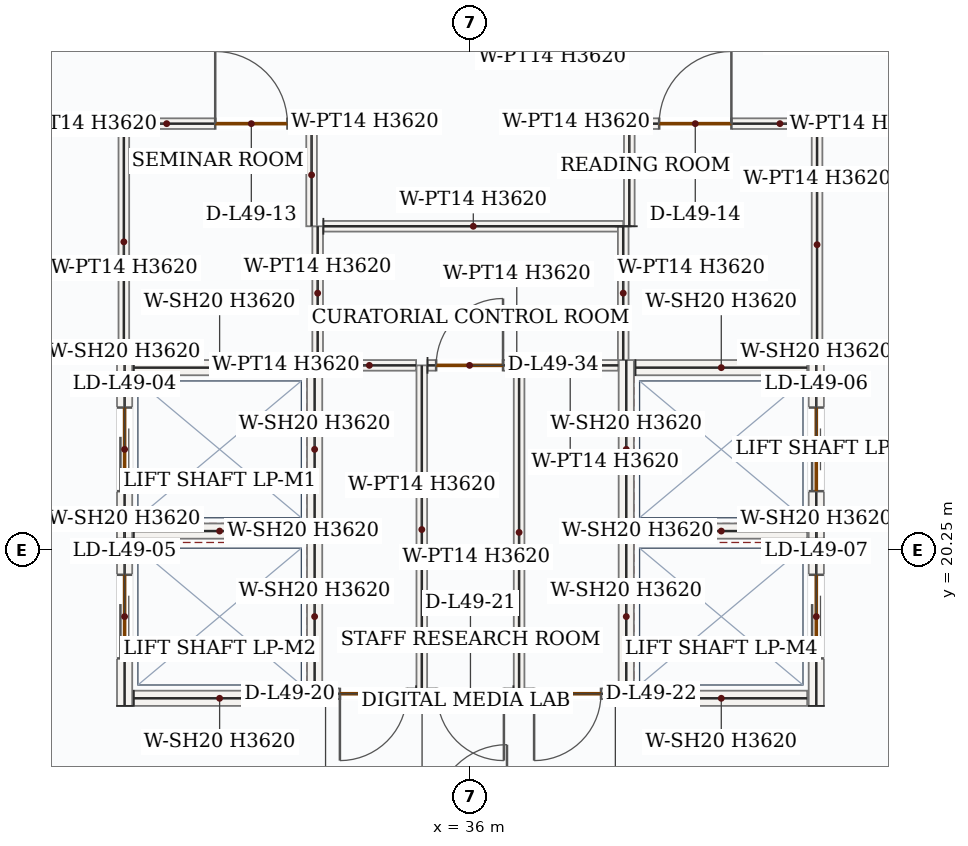
"""IFC4 building model, lengths in metres.
Left out: names, types, materials, properties, quantities, classifications, styles, units other than length and angle.
Written with IfcOpenShell. Run it as: python <this file> out.ifc"""

import sys

from ifc_helpers import new_model, si_unit, direction, frame, frame_2d, origin, place, context, subcontext, project, spatial, rectangle, extrude, source, transform, mapped, element, fill, save


model = new_model("IFC4")
c1 = context("Model", 3, precision=1e-05, world=origin(), true_north=direction((0.0, 1.0)))
c2 = subcontext(c1, "Body", "Model", "MODEL_VIEW")
j1 = project(units=[si_unit("LENGTHUNIT", "METRE"), si_unit("PLANEANGLEUNIT", "RADIAN")], contexts=[c1])
p1 = place(None, origin())
s1 = spatial("IfcSite", under=j1, at=p1, CompositionType="ELEMENT")
p2 = place(p1, origin())
s2 = spatial("IfcBuilding", under=s1, at=p2, CompositionType="ELEMENT")
p3 = place(p2, frame((0.0, 0.0, 209.7)))
s3 = spatial("IfcBuildingStorey", under=s2, at=p3, CompositionType="ELEMENT", Elevation=209.7)
p4 = place(p3, frame((31.45, 20.4, 0.0), z_axis=(0.0, 0.0, 1.0), x_axis=(0.0, 1.0, 0.0)))
e1 = element("IfcWall", 1, at=p4, inside=s3, PredefinedType="SOLIDWALL", context=c2, shape_type="SweptSolid", body=[
    extrude(rectangle(XDim=2.35, YDim=0.2, at=frame_2d((1.175, 0.0))), origin(), (0.0, 0.0, 1.0), 3.62),
])
p5 = place(p4, frame((0.625, 0.0, 0.0)))
e2 = element("IfcOpeningElement", 2, at=p5, cuts=e1, PredefinedType="OPENING", context=c2, shape_type="SweptSolid", body=[
    extrude(rectangle(XDim=1.1, YDim=2.15, at=frame_2d((0.55, 1.075))), frame((0.0, 0.11, 0.0), z_axis=(0.0, -1.0, 0.0), x_axis=(1.0, 0.0, 0.0)), (0.0, 0.0, 1.0), 0.22),
])
m1 = source(origin(), c2, "Body", "SweptSolid", [
    extrude(rectangle(XDim=2.35, YDim=0.2, at=frame_2d((1.175, 0.0))), origin(), (0.0, 0.0, 1.0), 3.62),
])
p6 = place(p3, frame((33.95, 20.4, 0.0), z_axis=(0.0, 0.0, 1.0), x_axis=(0.0, 1.0, 0.0)))
e3 = element("IfcWall", 3, at=p6, inside=s3, PredefinedType="SOLIDWALL", context=c2, shape_type="MappedRepresentation", body=[
    mapped(m1, transform((0.0, 0.0, 0.0), x_axis=(1.0, 0.0, 0.0), y_axis=(0.0, 1.0, 0.0), z_axis=(0.0, 0.0, 1.0), scale=1.0)),
])
m2 = source(origin(), c2, "Body", "SweptSolid", [
    extrude(rectangle(XDim=2.26, YDim=0.2, at=frame_2d((1.13, 0.0))), origin(), (0.0, 0.0, 1.0), 3.62),
])
for number, where, z_axis, x_axis in (
    (4, (31.57, 20.5, 0.0), (0.0, 0.0, 1.0), (1.0, 0.0, 0.0)),
    (5, (31.57, 22.65, 0.0), (0.0, 0.0, 1.0), (1.0, 0.0, 0.0)),
):
    element("IfcWall", number, at=place(p3, frame(where, z_axis=z_axis, x_axis=x_axis)), inside=s3, PredefinedType="SOLIDWALL", context=c2, shape_type="MappedRepresentation", body=[
        mapped(m2, transform((0.0, 0.0, 0.0), x_axis=(1.0, 0.0, 0.0), y_axis=(0.0, 1.0, 0.0), z_axis=(0.0, 0.0, 1.0), scale=1.0)),
    ])
p7 = place(p3, frame((31.45, 18.2, 0.0), z_axis=(0.0, 0.0, 1.0), x_axis=(0.0, 1.0, 0.0)))
e6 = element("IfcWall", 6, at=p7, inside=s3, PredefinedType="SOLIDWALL", context=c2, shape_type="SweptSolid", body=[
    extrude(rectangle(XDim=2.35, YDim=0.2, at=frame_2d((1.175, 0.0))), origin(), (0.0, 0.0, 1.0), 3.62),
])
p8 = place(p7, frame((0.625, 0.0, 0.0)))
e7 = element("IfcOpeningElement", 7, at=p8, cuts=e6, PredefinedType="OPENING", context=c2, shape_type="SweptSolid", body=[
    extrude(rectangle(XDim=1.1, YDim=2.15, at=frame_2d((0.55, 1.075))), frame((0.0, 0.11, 0.0), z_axis=(0.0, -1.0, 0.0), x_axis=(1.0, 0.0, 0.0)), (0.0, 0.0, 1.0), 0.22),
])
p9 = place(p3, frame((33.95, 18.2, 0.0), z_axis=(0.0, 0.0, 1.0), x_axis=(0.0, 1.0, 0.0)))
e8 = element("IfcWall", 8, at=p9, inside=s3, PredefinedType="SOLIDWALL", context=c2, shape_type="MappedRepresentation", body=[
    mapped(m1, transform((0.0, 0.0, 0.0), x_axis=(1.0, 0.0, 0.0), y_axis=(0.0, 1.0, 0.0), z_axis=(0.0, 0.0, 1.0), scale=1.0)),
])
p10 = place(p3, frame((31.57, 18.3, 0.0), z_axis=(0.0, 0.0, 1.0), x_axis=(1.0, 0.0, 0.0)))
e9 = element("IfcWall", 9, at=p10, inside=s3, PredefinedType="SOLIDWALL", context=c2, shape_type="MappedRepresentation", body=[
    mapped(m2, transform((0.0, 0.0, 0.0), x_axis=(1.0, 0.0, 0.0), y_axis=(0.0, 1.0, 0.0), z_axis=(0.0, 0.0, 1.0), scale=1.0)),
])
p11 = place(p3, frame((38.05, 20.4, 0.0), z_axis=(0.0, 0.0, 1.0), x_axis=(0.0, 1.0, 0.0)))
e10 = element("IfcWall", 10, at=p11, inside=s3, PredefinedType="SOLIDWALL", context=c2, shape_type="MappedRepresentation", body=[
    mapped(m1, transform((0.0, 0.0, 0.0), x_axis=(1.0, 0.0, 0.0), y_axis=(0.0, 1.0, 0.0), z_axis=(0.0, 0.0, 1.0), scale=1.0)),
])
p12 = place(p3, frame((40.55, 20.4, 0.0), z_axis=(0.0, 0.0, 1.0), x_axis=(0.0, 1.0, 0.0)))
e11 = element("IfcWall", 11, at=p12, inside=s3, PredefinedType="SOLIDWALL", context=c2, shape_type="SweptSolid", body=[
    extrude(rectangle(XDim=2.35, YDim=0.2, at=frame_2d((1.175, 0.0))), origin(), (0.0, 0.0, 1.0), 3.62),
])
p13 = place(p12, frame((0.625, 0.0, 0.0)))
e12 = element("IfcOpeningElement", 12, at=p13, cuts=e11, PredefinedType="OPENING", context=c2, shape_type="SweptSolid", body=[
    extrude(rectangle(XDim=1.1, YDim=2.15, at=frame_2d((0.55, 1.075))), frame((0.0, 0.11, 0.0), z_axis=(0.0, -1.0, 0.0), x_axis=(1.0, 0.0, 0.0)), (0.0, 0.0, 1.0), 0.22),
])
for number, where, z_axis, x_axis in (
    (13, (38.17, 20.5, 0.0), (0.0, 0.0, 1.0), (1.0, 0.0, 0.0)),
    (14, (38.17, 22.65, 0.0), (0.0, 0.0, 1.0), (1.0, 0.0, 0.0)),
):
    element("IfcWall", number, at=place(p3, frame(where, z_axis=z_axis, x_axis=x_axis)), inside=s3, PredefinedType="SOLIDWALL", context=c2, shape_type="MappedRepresentation", body=[
        mapped(m2, transform((0.0, 0.0, 0.0), x_axis=(1.0, 0.0, 0.0), y_axis=(0.0, 1.0, 0.0), z_axis=(0.0, 0.0, 1.0), scale=1.0)),
    ])
p14 = place(p3, frame((38.05, 18.2, 0.0), z_axis=(0.0, 0.0, 1.0), x_axis=(0.0, 1.0, 0.0)))
e15 = element("IfcWall", 15, at=p14, inside=s3, PredefinedType="SOLIDWALL", context=c2, shape_type="MappedRepresentation", body=[
    mapped(m1, transform((0.0, 0.0, 0.0), x_axis=(1.0, 0.0, 0.0), y_axis=(0.0, 1.0, 0.0), z_axis=(0.0, 0.0, 1.0), scale=1.0)),
])
p15 = place(p3, frame((40.55, 18.2, 0.0), z_axis=(0.0, 0.0, 1.0), x_axis=(0.0, 1.0, 0.0)))
e16 = element("IfcWall", 16, at=p15, inside=s3, PredefinedType="SOLIDWALL", context=c2, shape_type="SweptSolid", body=[
    extrude(rectangle(XDim=2.35, YDim=0.2, at=frame_2d((1.175, 0.0))), origin(), (0.0, 0.0, 1.0), 3.62),
])
p16 = place(p15, frame((0.625, 0.0, 0.0)))
e17 = element("IfcOpeningElement", 17, at=p16, cuts=e16, PredefinedType="OPENING", context=c2, shape_type="SweptSolid", body=[
    extrude(rectangle(XDim=1.1, YDim=2.15, at=frame_2d((0.55, 1.075))), frame((0.0, 0.11, 0.0), z_axis=(0.0, -1.0, 0.0), x_axis=(1.0, 0.0, 0.0)), (0.0, 0.0, 1.0), 0.22),
])
p17 = place(p3, frame((38.17, 18.3, 0.0), z_axis=(0.0, 0.0, 1.0), x_axis=(1.0, 0.0, 0.0)))
e18 = element("IfcWall", 18, at=p17, inside=s3, PredefinedType="SOLIDWALL", context=c2, shape_type="MappedRepresentation", body=[
    mapped(m2, transform((0.0, 0.0, 0.0), x_axis=(1.0, 0.0, 0.0), y_axis=(0.0, 1.0, 0.0), z_axis=(0.0, 0.0, 1.0), scale=1.0)),
])
m3 = source(origin(), c2, "Body", "SweptSolid", [
    extrude(rectangle(XDim=4.32, YDim=0.14, at=frame_2d((2.16, 0.0))), origin(), (0.0, 0.0, 1.0), 3.62),
])
p18 = place(p3, frame((35.36, 18.36, 0.0), z_axis=(0.0, 0.0, 1.0), x_axis=(0.0, 1.0, 0.0)))
e19 = element("IfcWall", 19, at=p18, inside=s3, PredefinedType="PARTITIONING", context=c2, shape_type="MappedRepresentation", body=[
    mapped(m3, transform((0.0, 0.0, 0.0), x_axis=(1.0, 0.0, 0.0), y_axis=(0.0, 1.0, 0.0), z_axis=(0.0, 0.0, 1.0), scale=1.0)),
])
p19 = place(p3, frame((35.435, 22.68, 0.0), z_axis=(0.0, 0.0, 1.0), x_axis=(1.0, 0.0, 0.0)))
e20 = element("IfcWall", 20, at=p19, inside=s3, PredefinedType="PARTITIONING", context=c2, shape_type="SweptSolid", body=[
    extrude(rectangle(XDim=1.205, YDim=0.14, at=frame_2d((0.603, 0.0))), origin(), (0.0, 0.0, 1.0), 3.62),
])
p20 = place(p19, frame((0.114, 0.0, 0.0)))
e21 = element("IfcOpeningElement", 21, at=p20, cuts=e20, PredefinedType="OPENING", context=c2, shape_type="SweptSolid", body=[
    extrude(rectangle(XDim=0.88, YDim=2.1, at=frame_2d((0.44, 1.05))), frame((0.0, 0.08, 0.0), z_axis=(0.0, -1.0, 0.0), x_axis=(1.0, 0.0, 0.0)), (0.0, 0.0, 1.0), 0.16),
])
m4 = source(origin(), c2, "Body", "SweptSolid", [
    extrude(rectangle(XDim=4.245, YDim=0.14, at=frame_2d((2.123, 0.0))), origin(), (0.0, 0.0, 1.0), 3.62),
])
p21 = place(p3, frame((36.64, 22.605, 0.0), z_axis=(0.0, 0.0, 1.0), x_axis=(0.0, -1.0, 0.0)))
e22 = element("IfcWall", 22, at=p21, inside=s3, PredefinedType="PARTITIONING", context=c2, shape_type="MappedRepresentation", body=[
    mapped(m4, transform((0.0, 0.0, 0.0), x_axis=(1.0, 0.0, 0.0), y_axis=(0.0, 1.0, 0.0), z_axis=(0.0, 0.0, 1.0), scale=1.0)),
])
p22 = place(p3, frame((36.565, 18.36, 0.0), z_axis=(0.0, 0.0, 1.0), x_axis=(-1.0, 0.0, 0.0)))
e23 = element("IfcWall", 23, at=p22, inside=s3, PredefinedType="PARTITIONING", context=c2, shape_type="SweptSolid", body=[
    extrude(rectangle(XDim=1.13, YDim=0.14, at=frame_2d((0.565, 0.0))), origin(), (0.0, 0.0, 1.0), 3.62),
])
p23 = place(p22, frame((0.125, 0.0, 0.0)))
e24 = element("IfcOpeningElement", 24, at=p23, cuts=e23, PredefinedType="OPENING", context=c2, shape_type="SweptSolid", body=[
    extrude(rectangle(XDim=0.88, YDim=2.1, at=frame_2d((0.44, 1.05))), frame((0.0, 0.08, 0.0), z_axis=(0.0, -1.0, 0.0), x_axis=(1.0, 0.0, 0.0)), (0.0, 0.0, 1.0), 0.16),
])
m5 = source(origin(), c2, "Body", "SweptSolid", [
    extrude(rectangle(XDim=1.23, YDim=0.14, at=frame_2d((0.615, 0.0))), origin(), (0.0, 0.0, 1.0), 3.62),
])
p24 = place(p3, frame((34.055, 22.68, 0.0), z_axis=(0.0, 0.0, 1.0), x_axis=(1.0, 0.0, 0.0)))
e25 = element("IfcWall", 25, at=p24, inside=s3, PredefinedType="PARTITIONING", context=c2, shape_type="MappedRepresentation", body=[
    mapped(m5, transform((0.0, 0.0, 0.0), x_axis=(1.0, 0.0, 0.0), y_axis=(0.0, 1.0, 0.0), z_axis=(0.0, 0.0, 1.0), scale=1.0)),
])
p25 = place(p3, frame((35.285, 18.36, 0.0), z_axis=(0.0, 0.0, 1.0), x_axis=(-1.0, 0.0, 0.0)))
e26 = element("IfcWall", 26, at=p25, inside=s3, PredefinedType="PARTITIONING", context=c2, shape_type="SweptSolid", body=[
    extrude(rectangle(XDim=1.23, YDim=0.14, at=frame_2d((0.615, 0.0))), origin(), (0.0, 0.0, 1.0), 3.62),
])
p26 = place(p25, frame((0.123, 0.0, 0.0)))
e27 = element("IfcOpeningElement", 27, at=p26, cuts=e26, PredefinedType="OPENING", context=c2, shape_type="SweptSolid", body=[
    extrude(rectangle(XDim=0.88, YDim=2.1, at=frame_2d((0.44, 1.05))), frame((0.0, 0.08, 0.0), z_axis=(0.0, -1.0, 0.0), x_axis=(1.0, 0.0, 0.0)), (0.0, 0.0, 1.0), 0.16),
])
m6 = source(origin(), c2, "Body", "SweptSolid", [
    extrude(rectangle(XDim=1.265, YDim=0.14, at=frame_2d((0.633, 0.0))), origin(), (0.0, 0.0, 1.0), 3.62),
])
p27 = place(p3, frame((36.68, 22.68, 0.0), z_axis=(0.0, 0.0, 1.0), x_axis=(1.0, 0.0, 0.0)))
e28 = element("IfcWall", 28, at=p27, inside=s3, PredefinedType="PARTITIONING", context=c2, shape_type="MappedRepresentation", body=[
    mapped(m6, transform((0.0, 0.0, 0.0), x_axis=(1.0, 0.0, 0.0), y_axis=(0.0, 1.0, 0.0), z_axis=(0.0, 0.0, 1.0), scale=1.0)),
])
p28 = place(p3, frame((37.945, 18.36, 0.0), z_axis=(0.0, 0.0, 1.0), x_axis=(-1.0, 0.0, 0.0)))
e29 = element("IfcWall", 29, at=p28, inside=s3, PredefinedType="PARTITIONING", context=c2, shape_type="SweptSolid", body=[
    extrude(rectangle(XDim=1.23, YDim=0.14, at=frame_2d((0.615, 0.0))), origin(), (0.0, 0.0, 1.0), 3.62),
])
p29 = place(p28, frame((0.228, 0.0, 0.0)))
e30 = element("IfcOpeningElement", 30, at=p29, cuts=e29, PredefinedType="OPENING", context=c2, shape_type="SweptSolid", body=[
    extrude(rectangle(XDim=0.88, YDim=2.1, at=frame_2d((0.44, 1.05))), frame((0.0, 0.08, 0.0), z_axis=(0.0, -1.0, 0.0), x_axis=(1.0, 0.0, 0.0)), (0.0, 0.0, 1.0), 0.16),
])
m7 = source(origin(), c2, "Body", "SweptSolid", [
    extrude(rectangle(XDim=1.76, YDim=0.14, at=frame_2d((0.88, 0.0))), origin(), (0.0, 0.0, 1.0), 3.62),
])
p30 = place(p3, frame((33.99, 22.75, 0.0), z_axis=(0.0, 0.0, 1.0), x_axis=(0.0, 1.0, 0.0)))
e31 = element("IfcWall", 31, at=p30, inside=s3, PredefinedType="PARTITIONING", context=c2, shape_type="MappedRepresentation", body=[
    mapped(m7, transform((0.0, 0.0, 0.0), x_axis=(1.0, 0.0, 0.0), y_axis=(0.0, 1.0, 0.0), z_axis=(0.0, 0.0, 1.0), scale=1.0)),
])
m8 = source(origin(), c2, "Body", "SweptSolid", [
    extrude(rectangle(XDim=3.945, YDim=0.14, at=frame_2d((1.973, 0.0))), origin(), (0.0, 0.0, 1.0), 3.62),
])
p31 = place(p3, frame((34.065, 24.51, 0.0), z_axis=(0.0, 0.0, 1.0), x_axis=(1.0, 0.0, 0.0)))
e32 = element("IfcWall", 32, at=p31, inside=s3, PredefinedType="PARTITIONING", context=c2, shape_type="MappedRepresentation", body=[
    mapped(m8, transform((0.0, 0.0, 0.0), x_axis=(1.0, 0.0, 0.0), y_axis=(0.0, 1.0, 0.0), z_axis=(0.0, 0.0, 1.0), scale=1.0)),
])
p32 = place(p3, frame((38.01, 24.51, 0.0), z_axis=(0.0, 0.0, 1.0), x_axis=(0.0, -1.0, 0.0)))
e33 = element("IfcWall", 33, at=p32, inside=s3, PredefinedType="PARTITIONING", context=c2, shape_type="MappedRepresentation", body=[
    mapped(m7, transform((0.0, 0.0, 0.0), x_axis=(1.0, 0.0, 0.0), y_axis=(0.0, 1.0, 0.0), z_axis=(0.0, 0.0, 1.0), scale=1.0)),
])
m9 = source(origin(), c2, "Body", "SweptSolid", [
    extrude(rectangle(XDim=3.11, YDim=0.14, at=frame_2d((1.555, 0.0))), origin(), (0.0, 0.0, 1.0), 3.62),
])
p33 = place(p3, frame((31.44, 22.75, 0.0), z_axis=(0.0, 0.0, 1.0), x_axis=(0.0, 1.0, 0.0)))
e34 = element("IfcWall", 34, at=p33, inside=s3, PredefinedType="PARTITIONING", context=c2, shape_type="MappedRepresentation", body=[
    mapped(m9, transform((0.0, 0.0, 0.0), x_axis=(1.0, 0.0, 0.0), y_axis=(0.0, 1.0, 0.0), z_axis=(0.0, 0.0, 1.0), scale=1.0)),
])
p34 = place(p3, frame((31.515, 25.86, 0.0), z_axis=(0.0, 0.0, 1.0), x_axis=(1.0, 0.0, 0.0)))
e35 = element("IfcWall", 35, at=p34, inside=s3, PredefinedType="PARTITIONING", context=c2, shape_type="SweptSolid", body=[
    extrude(rectangle(XDim=2.395, YDim=0.14, at=frame_2d((1.198, 0.0))), origin(), (0.0, 0.0, 1.0), 3.62),
])
p35 = place(p34, frame((1.127, 0.0, 0.0)))
e36 = element("IfcOpeningElement", 36, at=p35, cuts=e35, PredefinedType="OPENING", context=c2, shape_type="SweptSolid", body=[
    extrude(rectangle(XDim=0.95, YDim=2.15, at=frame_2d((0.475, 1.075))), frame((0.0, 0.08, 0.0), z_axis=(0.0, -1.0, 0.0), x_axis=(1.0, 0.0, 0.0)), (0.0, 0.0, 1.0), 0.16),
])
m10 = source(origin(), c2, "Body", "SweptSolid", [
    extrude(rectangle(XDim=1.35, YDim=0.14, at=frame_2d((0.675, 0.0))), origin(), (0.0, 0.0, 1.0), 3.62),
])
for number, where, z_axis, x_axis in (
    (37, (33.91, 25.86, 0.0), (0.0, 0.0, 1.0), (0.0, -1.0, 0.0)),
    (38, (38.09, 24.51, 0.0), (0.0, 0.0, 1.0), (0.0, 1.0, 0.0)),
):
    element("IfcWall", number, at=place(p3, frame(where, z_axis=z_axis, x_axis=x_axis)), inside=s3, PredefinedType="PARTITIONING", context=c2, shape_type="MappedRepresentation", body=[
        mapped(m10, transform((0.0, 0.0, 0.0), x_axis=(1.0, 0.0, 0.0), y_axis=(0.0, 1.0, 0.0), z_axis=(0.0, 0.0, 1.0), scale=1.0)),
    ])
p36 = place(p3, frame((38.165, 25.86, 0.0), z_axis=(0.0, 0.0, 1.0), x_axis=(1.0, 0.0, 0.0)))
e39 = element("IfcWall", 39, at=p36, inside=s3, PredefinedType="PARTITIONING", context=c2, shape_type="SweptSolid", body=[
    extrude(rectangle(XDim=2.395, YDim=0.14, at=frame_2d((1.198, 0.0))), origin(), (0.0, 0.0, 1.0), 3.62),
])
p37 = place(p36, frame((0.318, 0.0, 0.0)))
e40 = element("IfcOpeningElement", 40, at=p37, cuts=e39, PredefinedType="OPENING", context=c2, shape_type="SweptSolid", body=[
    extrude(rectangle(XDim=0.95, YDim=2.15, at=frame_2d((0.475, 1.075))), frame((0.0, 0.08, 0.0), z_axis=(0.0, -1.0, 0.0), x_axis=(1.0, 0.0, 0.0)), (0.0, 0.0, 1.0), 0.16),
])
m11 = source(origin(), c2, "Body", "SweptSolid", [
    extrude(rectangle(XDim=3.035, YDim=0.14, at=frame_2d((1.518, 0.0))), origin(), (0.0, 0.0, 1.0), 3.62),
])
p38 = place(p3, frame((40.56, 25.785, 0.0), z_axis=(0.0, 0.0, 1.0), x_axis=(0.0, -1.0, 0.0)))
e41 = element("IfcWall", 41, at=p38, inside=s3, PredefinedType="PARTITIONING", context=c2, shape_type="MappedRepresentation", body=[
    mapped(m11, transform((0.0, 0.0, 0.0), x_axis=(1.0, 0.0, 0.0), y_axis=(0.0, 1.0, 0.0), z_axis=(0.0, 0.0, 1.0), scale=1.0)),
])
m12 = source(origin(), c2, "Body", "SweptSolid", [
    extrude(rectangle(XDim=1.1, YDim=2.15, at=frame_2d((0.55, 1.075))), frame((0.0, 0.025, 0.0), z_axis=(0.0, -1.0, 0.0), x_axis=(1.0, 0.0, 0.0)), (0.0, 0.0, 1.0), 0.05),
])
p39 = place(p5, origin())
e42 = element("IfcDoor", 42, at=p39, inside=s3, OperationType="DOUBLE_DOOR_SLIDING", PredefinedType="DOOR", context=c2, shape_type="MappedRepresentation", body=[
    mapped(m12, transform((0.0, 0.0, 0.0), x_axis=(1.0, 0.0, 0.0), y_axis=(0.0, 1.0, 0.0), z_axis=(0.0, 0.0, 1.0), scale=1.0)),
])
fill(e2, e42)
p40 = place(p8, origin())
e43 = element("IfcDoor", 43, at=p40, inside=s3, OperationType="DOUBLE_DOOR_SLIDING", PredefinedType="DOOR", context=c2, shape_type="MappedRepresentation", body=[
    mapped(m12, transform((0.0, 0.0, 0.0), x_axis=(1.0, 0.0, 0.0), y_axis=(0.0, 1.0, 0.0), z_axis=(0.0, 0.0, 1.0), scale=1.0)),
])
fill(e7, e43)
p41 = place(p13, origin())
e44 = element("IfcDoor", 44, at=p41, inside=s3, OperationType="DOUBLE_DOOR_SLIDING", PredefinedType="DOOR", context=c2, shape_type="MappedRepresentation", body=[
    mapped(m12, transform((0.0, 0.0, 0.0), x_axis=(1.0, 0.0, 0.0), y_axis=(0.0, 1.0, 0.0), z_axis=(0.0, 0.0, 1.0), scale=1.0)),
])
fill(e12, e44)
p42 = place(p16, origin())
e45 = element("IfcDoor", 45, at=p42, inside=s3, OperationType="DOUBLE_DOOR_SLIDING", PredefinedType="DOOR", context=c2, shape_type="MappedRepresentation", body=[
    mapped(m12, transform((0.0, 0.0, 0.0), x_axis=(1.0, 0.0, 0.0), y_axis=(0.0, 1.0, 0.0), z_axis=(0.0, 0.0, 1.0), scale=1.0)),
])
fill(e17, e45)
m13 = source(origin(), c2, "Body", "SweptSolid", [
    extrude(rectangle(XDim=0.95, YDim=2.15, at=frame_2d((0.475, 1.075))), frame((0.0, 0.025, 0.0), z_axis=(0.0, -1.0, 0.0), x_axis=(1.0, 0.0, 0.0)), (0.0, 0.0, 1.0), 0.05),
])
p43 = place(p35, origin())
e46 = element("IfcDoor", 46, at=p43, inside=s3, OperationType="SINGLE_SWING_LEFT", PredefinedType="DOOR", context=c2, shape_type="MappedRepresentation", body=[
    mapped(m13, transform((0.0, 0.0, 0.0), x_axis=(1.0, 0.0, 0.0), y_axis=(0.0, 1.0, 0.0), z_axis=(0.0, 0.0, 1.0), scale=1.0)),
])
fill(e36, e46)
p44 = place(p37, origin())
e47 = element("IfcDoor", 47, at=p44, inside=s3, OperationType="SINGLE_SWING_RIGHT", PredefinedType="DOOR", context=c2, shape_type="MappedRepresentation", body=[
    mapped(m13, transform((0.0, 0.0, 0.0), x_axis=(1.0, 0.0, 0.0), y_axis=(0.0, 1.0, 0.0), z_axis=(0.0, 0.0, 1.0), scale=1.0)),
])
fill(e40, e47)
m14 = source(origin(), c2, "Body", "SweptSolid", [
    extrude(rectangle(XDim=0.88, YDim=2.1, at=frame_2d((0.44, 1.05))), frame((0.0, 0.025, 0.0), z_axis=(0.0, -1.0, 0.0), x_axis=(1.0, 0.0, 0.0)), (0.0, 0.0, 1.0), 0.05),
])
p45 = place(p26, origin())
e48 = element("IfcDoor", 48, at=p45, inside=s3, OperationType="SINGLE_SWING_RIGHT", PredefinedType="DOOR", context=c2, shape_type="MappedRepresentation", body=[
    mapped(m14, transform((0.0, 0.0, 0.0), x_axis=(1.0, 0.0, 0.0), y_axis=(0.0, 1.0, 0.0), z_axis=(0.0, 0.0, 1.0), scale=1.0)),
])
fill(e27, e48)
p46 = place(p23, origin())
e49 = element("IfcDoor", 49, at=p46, inside=s3, OperationType="SINGLE_SWING_LEFT", PredefinedType="DOOR", context=c2, shape_type="MappedRepresentation", body=[
    mapped(m14, transform((0.0, 0.0, 0.0), x_axis=(1.0, 0.0, 0.0), y_axis=(0.0, 1.0, 0.0), z_axis=(0.0, 0.0, 1.0), scale=1.0)),
])
fill(e24, e49)
p47 = place(p29, origin())
e50 = element("IfcDoor", 50, at=p47, inside=s3, OperationType="SINGLE_SWING_RIGHT", PredefinedType="DOOR", context=c2, shape_type="MappedRepresentation", body=[
    mapped(m14, transform((0.0, 0.0, 0.0), x_axis=(1.0, 0.0, 0.0), y_axis=(0.0, 1.0, 0.0), z_axis=(0.0, 0.0, 1.0), scale=1.0)),
])
fill(e30, e50)
p48 = place(p20, origin())
e51 = element("IfcDoor", 51, at=p48, inside=s3, OperationType="SINGLE_SWING_RIGHT", PredefinedType="DOOR", context=c2, shape_type="MappedRepresentation", body=[
    mapped(m14, transform((0.0, 0.0, 0.0), x_axis=(1.0, 0.0, 0.0), y_axis=(0.0, 1.0, 0.0), z_axis=(0.0, 0.0, 1.0), scale=1.0)),
])
fill(e21, e51)
save(model, sys.argv[1])
